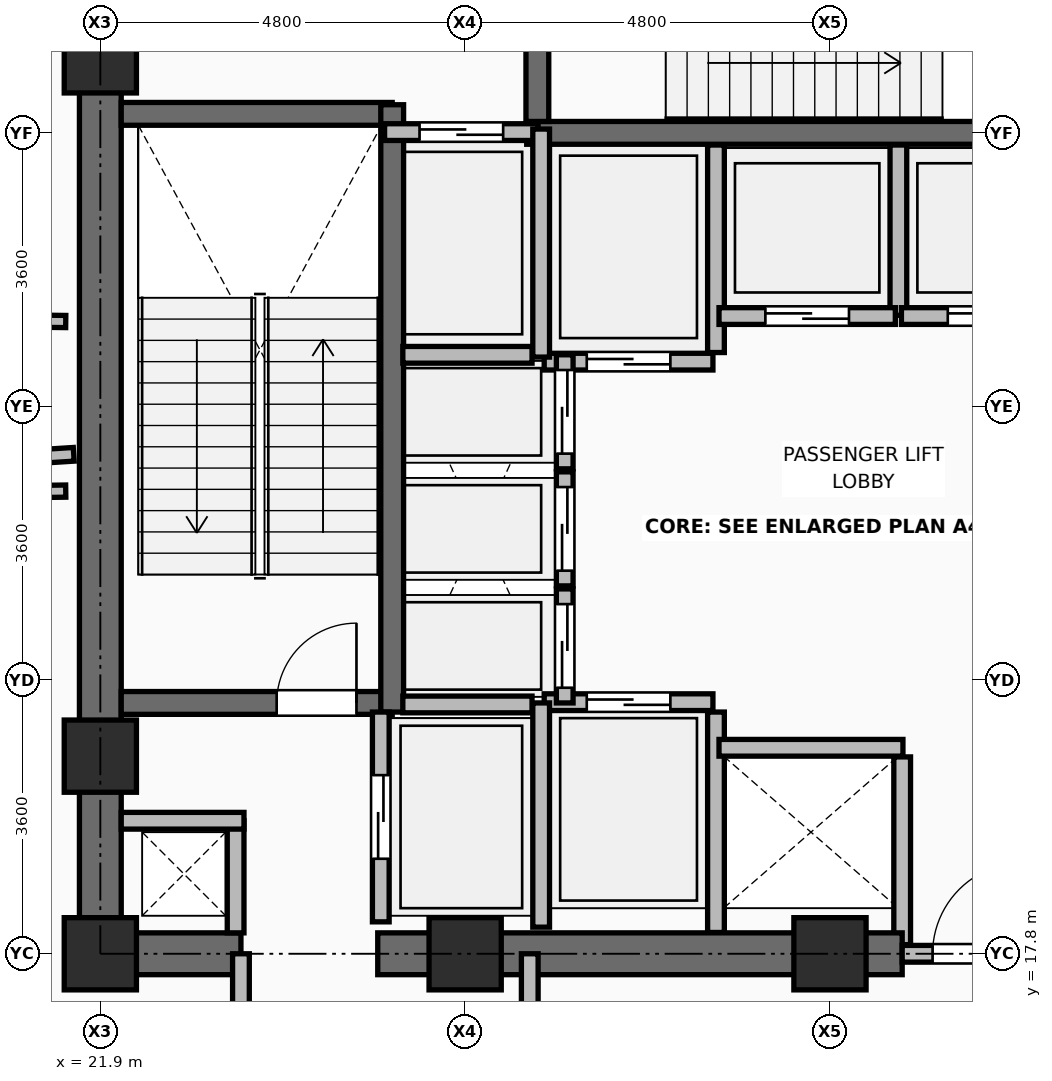
"""IFC4 building model, lengths in metres.
Left out: names, types, materials, properties, quantities, classifications, styles, units other than length and angle.
Written with IfcOpenShell. Run it as: python <this file> out.ifc"""

import sys

from ifc_helpers import new_model, si_unit, direction, frame, frame_2d, origin, origin_2d, place, context, subcontext, project, spatial, rectangle, extrude, element, fill, save


model = new_model("IFC4")
c1 = context("Model", 3, precision=1e-05, world=origin(), true_north=direction((0.0, 1.0)))
c2 = subcontext(c1, "Body", "Model", "MODEL_VIEW")
j1 = project(units=[si_unit("LENGTHUNIT", "METRE"), si_unit("PLANEANGLEUNIT", "RADIAN")], contexts=[c1])
p1 = place(None, origin())
s1 = spatial("IfcSite", under=j1, at=p1, CompositionType="ELEMENT")
p2 = place(p1, origin())
s2 = spatial("IfcBuilding", under=s1, at=p2, CompositionType="ELEMENT")
p3 = place(p2, frame((0.0, 0.0, 96.15)))
s3 = spatial("IfcBuildingStorey", under=s2, at=p3, CompositionType="ELEMENT", Elevation=96.15)
for number, where, z_axis, x_axis in (
    (1, (21.9, 17.8, 0.0), (0.0, 0.0, 1.0), (1.0, 0.0, 0.0)),
    (2, (26.7, 17.8, 0.0), (0.0, 0.0, 1.0), (1.0, 0.0, 0.0)),
    (3, (31.5, 17.8, 0.0), (0.0, 0.0, 1.0), (1.0, 0.0, 0.0)),
    (4, (21.9, 20.4, 0.0), (0.0, 0.0, 1.0), (1.0, 0.0, 0.0)),
    (5, (21.9, 29.6, 0.0), (0.0, 0.0, 1.0), (1.0, 0.0, 0.0)),
):
    element("IfcColumn", number, at=place(p3, frame(where, z_axis=z_axis, x_axis=x_axis)), inside=s3, PredefinedType="COLUMN", context=c2, shape_type="SweptSolid", body=[
        extrude(rectangle(XDim=0.95, YDim=0.95, at=origin_2d()), origin(), (0.0, 0.0, 1.0), 4.8),
    ])
p4 = place(p3, frame((30.0, 18.08, 0.0), z_axis=(0.0, 0.0, 1.0), x_axis=(0.0, 1.0, 0.0)))
e6 = element("IfcWall", 6, at=p4, inside=s3, PredefinedType="PARTITIONING", context=c2, shape_type="SweptSolid", body=[
    extrude(rectangle(XDim=2.9, YDim=0.22, at=frame_2d((1.45, 0.0))), origin(), (0.0, 0.0, 1.0), 4.595),
])
p5 = place(p3, frame((32.45, 17.92, 0.0), z_axis=(0.0, 0.0, 1.0), x_axis=(0.0, 1.0, 0.0)))
e7 = element("IfcWall", 7, at=p5, inside=s3, PredefinedType="PARTITIONING", context=c2, shape_type="SweptSolid", body=[
    extrude(rectangle(XDim=2.47, YDim=0.22, at=frame_2d((1.235, 0.0))), origin(), (0.0, 0.0, 1.0), 4.056),
])
p6 = place(p3, frame((30.0, 25.71, 0.0), z_axis=(0.0, 0.0, 1.0), x_axis=(0.0, 1.0, 0.0)))
e8 = element("IfcWall", 8, at=p6, inside=s3, PredefinedType="PARTITIONING", context=c2, shape_type="SweptSolid", body=[
    extrude(rectangle(XDim=2.73, YDim=0.22, at=frame_2d((1.365, 0.0))), origin(), (0.0, 0.0, 1.0), 4.595),
])
p7 = place(p3, frame((32.4, 26.2, 0.0), z_axis=(0.0, 0.0, 1.0), x_axis=(0.0, 1.0, 0.0)))
e9 = element("IfcWall", 9, at=p7, inside=s3, PredefinedType="PARTITIONING", context=c2, shape_type="SweptSolid", body=[
    extrude(rectangle(XDim=2.24, YDim=0.22, at=frame_2d((1.12, 0.0))), origin(), (0.0, 0.0, 1.0), 4.595),
])
p8 = place(p3, frame((21.625, 17.8, 0.0), z_axis=(0.0, 0.0, 1.0), x_axis=(1.0, 0.0, 0.0)))
e10 = element("IfcWall", 10, at=p8, inside=s3, PredefinedType="SHEAR", context=c2, shape_type="SweptSolid", body=[
    extrude(rectangle(XDim=2.125, YDim=0.55, at=frame_2d((1.062, 0.0))), origin(), (0.0, 0.0, 1.0), 4.62),
])
p9 = place(p3, frame((25.55, 17.8, 0.0), z_axis=(0.0, 0.0, 1.0), x_axis=(1.0, 0.0, 0.0)))
e11 = element("IfcWall", 11, at=p9, inside=s3, PredefinedType="SHEAR", context=c2, shape_type="SweptSolid", body=[
    extrude(rectangle(XDim=6.9, YDim=0.55, at=frame_2d((3.45, 0.0))), origin(), (0.0, 0.0, 1.0), 4.62),
])
p10 = place(p3, frame((32.45, 17.8, 0.0), z_axis=(0.0, 0.0, 1.0), x_axis=(1.0, 0.0, 0.0)))
e12 = element("IfcWall", 12, at=p10, inside=s3, PredefinedType="PARTITIONING", context=c2, shape_type="SweptSolid", body=[
    extrude(rectangle(XDim=2.5, YDim=0.22, at=frame_2d((1.25, 0.0))), origin(), (0.0, 0.0, 1.0), 4.056),
])
p11 = place(p10, frame((0.4, 0.0, 0.0)))
e13 = element("IfcOpeningElement", 13, at=p11, cuts=e12, PredefinedType="OPENING", context=c2, shape_type="SweptSolid", body=[
    extrude(rectangle(XDim=1.2, YDim=2.1, at=frame_2d((0.6, 1.05))), frame((0.0, 0.12, 0.0), z_axis=(0.0, -1.0, 0.0), x_axis=(1.0, 0.0, 0.0)), (0.0, 0.0, 1.0), 0.24),
])
p12 = place(p3, frame((21.9, 18.075, 0.0), z_axis=(0.0, 0.0, 1.0), x_axis=(0.0, 1.0, 0.0)))
e14 = element("IfcWall", 14, at=p12, inside=s3, PredefinedType="SHEAR", context=c2, shape_type="SweptSolid", body=[
    extrude(rectangle(XDim=14.1, YDim=0.55, at=frame_2d((7.05, 0.0))), origin(), (0.0, 0.0, 1.0), 4.62),
])
p13 = place(p3, frame((22.175, 21.1, 0.0), z_axis=(0.0, 0.0, 1.0), x_axis=(1.0, 0.0, 0.0)))
e15 = element("IfcWall", 15, at=p13, inside=s3, PredefinedType="SHEAR", context=c2, shape_type="SweptSolid", body=[
    extrude(rectangle(XDim=3.565, YDim=0.3, at=frame_2d((1.782, 0.0))), origin(), (0.0, 0.0, 1.0), 4.62),
])
p14 = place(p13, frame((2.045, 0.0, 0.0)))
e16 = element("IfcOpeningElement", 16, at=p14, cuts=e15, PredefinedType="OPENING", context=c2, shape_type="SweptSolid", body=[
    extrude(rectangle(XDim=1.05, YDim=2.1, at=frame_2d((0.525, 1.05))), frame((0.0, 0.16, 0.0), z_axis=(0.0, -1.0, 0.0), x_axis=(1.0, 0.0, 0.0)), (0.0, 0.0, 1.0), 0.32),
])
p15 = place(p3, frame((22.175, 28.85, 0.0), z_axis=(0.0, 0.0, 1.0), x_axis=(1.0, 0.0, 0.0)))
e17 = element("IfcWall", 17, at=p15, inside=s3, PredefinedType="SHEAR", context=c2, shape_type="SweptSolid", body=[
    extrude(rectangle(XDim=3.565, YDim=0.3, at=frame_2d((1.782, 0.0))), origin(), (0.0, 0.0, 1.0), 4.62),
])
p16 = place(p3, frame((25.74, 20.98, 0.0), z_axis=(0.0, 0.0, 1.0), x_axis=(0.0, 1.0, 0.0)))
e18 = element("IfcWall", 18, at=p16, inside=s3, PredefinedType="SHEAR", context=c2, shape_type="SweptSolid", body=[
    extrude(rectangle(XDim=7.99, YDim=0.3, at=frame_2d((3.995, 0.0))), origin(), (0.0, 0.0, 1.0), 4.62),
])
p17 = place(p3, frame((27.51, 28.6, 0.0), z_axis=(0.0, 0.0, 1.0), x_axis=(1.0, 0.0, 0.0)))
e19 = element("IfcWall", 19, at=p17, inside=s3, PredefinedType="SHEAR", context=c2, shape_type="SweptSolid", body=[
    extrude(rectangle(XDim=8.03, YDim=0.3, at=frame_2d((4.015, 0.0))), origin(), (0.0, 0.0, 1.0), 4.62),
])
p18 = place(p3, frame((27.65, 28.75, 0.0), z_axis=(0.0, 0.0, 1.0), x_axis=(0.0, 1.0, 0.0)))
e20 = element("IfcWall", 20, at=p18, inside=s3, PredefinedType="SHEAR", context=c2, shape_type="SweptSolid", body=[
    extrude(rectangle(XDim=3.425, YDim=0.3, at=frame_2d((1.712, 0.0))), origin(), (0.0, 0.0, 1.0), 4.62),
])
p19 = place(p18, frame((1.0, 0.0, 0.0)))
e21 = element("IfcOpeningElement", 21, at=p19, cuts=e20, PredefinedType="OPENING", context=c2, shape_type="SweptSolid", body=[
    extrude(rectangle(XDim=1.05, YDim=2.1, at=frame_2d((0.525, 1.05))), frame((0.0, 0.16, 0.0), z_axis=(0.0, -1.0, 0.0), x_axis=(1.0, 0.0, 0.0)), (0.0, 0.0, 1.0), 0.32),
])
p20 = place(p3, frame((23.68, 18.075, 0.0), z_axis=(0.0, 0.0, 1.0), x_axis=(0.0, 1.0, 0.0)))
e22 = element("IfcWall", 22, at=p20, inside=s3, PredefinedType="PARTITIONING", context=c2, shape_type="SweptSolid", body=[
    extrude(rectangle(XDim=1.475, YDim=0.22, at=frame_2d((0.738, 0.0))), origin(), (0.0, 0.0, 1.0), 4.6),
])
p21 = place(p3, frame((22.175, 19.55, 0.0), z_axis=(0.0, 0.0, 1.0), x_axis=(1.0, 0.0, 0.0)))
e23 = element("IfcWall", 23, at=p21, inside=s3, PredefinedType="PARTITIONING", context=c2, shape_type="SweptSolid", body=[
    extrude(rectangle(XDim=1.615, YDim=0.22, at=frame_2d((0.808, 0.0))), origin(), (0.0, 0.0, 1.0), 3.645),
])
p22 = place(p3, frame((25.59, 18.22, 0.0), z_axis=(0.0, 0.0, 1.0), x_axis=(0.0, 1.0, 0.0)))
e24 = element("IfcWall", 24, at=p22, inside=s3, PredefinedType="PARTITIONING", context=c2, shape_type="SweptSolid", body=[
    extrude(rectangle(XDim=2.76, YDim=0.22, at=frame_2d((1.38, 0.0))), origin(), (0.0, 0.0, 1.0), 4.6),
])
p23 = place(p22, frame((0.83, 0.0, 0.0)))
e25 = element("IfcOpeningElement", 25, at=p23, cuts=e24, PredefinedType="OPENING", context=c2, shape_type="SweptSolid", body=[
    extrude(rectangle(XDim=1.1, YDim=2.2, at=frame_2d((0.55, 1.1))), frame((0.0, 0.12, 0.0), z_axis=(0.0, -1.0, 0.0), x_axis=(1.0, 0.0, 0.0)), (0.0, 0.0, 1.0), 0.24),
])
p24 = place(p3, frame((25.64, 28.61, 0.0), z_axis=(0.0, 0.0, 1.0), x_axis=(1.0, 0.0, 0.0)))
e26 = element("IfcWall", 26, at=p24, inside=s3, PredefinedType="PARTITIONING", context=c2, shape_type="SweptSolid", body=[
    extrude(rectangle(XDim=2.02, YDim=0.22, at=frame_2d((1.01, 0.0))), origin(), (0.0, 0.0, 1.0), 4.6),
])
p25 = place(p24, frame((0.46, 0.0, 0.0)))
e27 = element("IfcOpeningElement", 27, at=p25, cuts=e26, PredefinedType="OPENING", context=c2, shape_type="SweptSolid", body=[
    extrude(rectangle(XDim=1.1, YDim=2.2, at=frame_2d((0.55, 1.1))), frame((0.0, 0.12, 0.0), z_axis=(0.0, -1.0, 0.0), x_axis=(1.0, 0.0, 0.0)), (0.0, 0.0, 1.0), 0.24),
])
p26 = place(p3, frame((27.74, 21.11, 0.0), z_axis=(0.0, 0.0, 1.0), x_axis=(1.0, 0.0, 0.0)))
e28 = element("IfcWall", 28, at=p26, inside=s3, PredefinedType="PARTITIONING", context=c2, shape_type="SweptSolid", body=[
    extrude(rectangle(XDim=2.22, YDim=0.22, at=frame_2d((1.11, 0.0))), origin(), (0.0, 0.0, 1.0), 4.6),
])
p27 = place(p26, frame((0.56, 0.0, 0.0)))
e29 = element("IfcOpeningElement", 29, at=p27, cuts=e28, PredefinedType="OPENING", context=c2, shape_type="SweptSolid", body=[
    extrude(rectangle(XDim=1.1, YDim=2.2, at=frame_2d((0.55, 1.1))), frame((0.0, 0.12, 0.0), z_axis=(0.0, -1.0, 0.0), x_axis=(1.0, 0.0, 0.0)), (0.0, 0.0, 1.0), 0.24),
])
p28 = place(p3, frame((27.74, 25.59, 0.0), z_axis=(0.0, 0.0, 1.0), x_axis=(1.0, 0.0, 0.0)))
e30 = element("IfcWall", 30, at=p28, inside=s3, PredefinedType="PARTITIONING", context=c2, shape_type="SweptSolid", body=[
    extrude(rectangle(XDim=2.22, YDim=0.22, at=frame_2d((1.11, 0.0))), origin(), (0.0, 0.0, 1.0), 4.6),
])
p29 = place(p28, frame((0.56, 0.0, 0.0)))
e31 = element("IfcOpeningElement", 31, at=p29, cuts=e30, PredefinedType="OPENING", context=c2, shape_type="SweptSolid", body=[
    extrude(rectangle(XDim=1.1, YDim=2.2, at=frame_2d((0.55, 1.1))), frame((0.0, 0.12, 0.0), z_axis=(0.0, -1.0, 0.0), x_axis=(1.0, 0.0, 0.0)), (0.0, 0.0, 1.0), 0.24),
])
p30 = place(p3, frame((30.04, 20.51, 0.0), z_axis=(0.0, 0.0, 1.0), x_axis=(1.0, 0.0, 0.0)))
e32 = element("IfcWall", 32, at=p30, inside=s3, PredefinedType="PARTITIONING", context=c2, shape_type="SweptSolid", body=[
    extrude(rectangle(XDim=2.42, YDim=0.22, at=frame_2d((1.21, 0.0))), origin(), (0.0, 0.0, 1.0), 4.6),
])
p31 = place(p3, frame((30.04, 26.19, 0.0), z_axis=(0.0, 0.0, 1.0), x_axis=(1.0, 0.0, 0.0)))
e33 = element("IfcWall", 33, at=p31, inside=s3, PredefinedType="PARTITIONING", context=c2, shape_type="SweptSolid", body=[
    extrude(rectangle(XDim=2.32, YDim=0.22, at=frame_2d((1.16, 0.0))), origin(), (0.0, 0.0, 1.0), 4.6),
])
p32 = place(p31, frame((0.61, 0.0, 0.0)))
e34 = element("IfcOpeningElement", 34, at=p32, cuts=e33, PredefinedType="OPENING", context=c2, shape_type="SweptSolid", body=[
    extrude(rectangle(XDim=1.1, YDim=2.2, at=frame_2d((0.55, 1.1))), frame((0.0, 0.12, 0.0), z_axis=(0.0, -1.0, 0.0), x_axis=(1.0, 0.0, 0.0)), (0.0, 0.0, 1.0), 0.24),
])
p33 = place(p3, frame((32.44, 26.19, 0.0), z_axis=(0.0, 0.0, 1.0), x_axis=(1.0, 0.0, 0.0)))
e35 = element("IfcWall", 35, at=p33, inside=s3, PredefinedType="PARTITIONING", context=c2, shape_type="SweptSolid", body=[
    extrude(rectangle(XDim=2.32, YDim=0.22, at=frame_2d((1.16, 0.0))), origin(), (0.0, 0.0, 1.0), 4.6),
])
p34 = place(p33, frame((0.61, 0.0, 0.0)))
e36 = element("IfcOpeningElement", 36, at=p34, cuts=e35, PredefinedType="OPENING", context=c2, shape_type="SweptSolid", body=[
    extrude(rectangle(XDim=1.1, YDim=2.2, at=frame_2d((0.55, 1.1))), frame((0.0, 0.12, 0.0), z_axis=(0.0, -1.0, 0.0), x_axis=(1.0, 0.0, 0.0)), (0.0, 0.0, 1.0), 0.24),
])
p35 = place(p3, frame((28.01, 21.1, 0.0), z_axis=(0.0, 0.0, 1.0), x_axis=(0.0, 1.0, 0.0)))
e37 = element("IfcWall", 37, at=p35, inside=s3, PredefinedType="PARTITIONING", context=c2, shape_type="SweptSolid", body=[
    extrude(rectangle(XDim=1.5, YDim=0.22, at=frame_2d((0.75, 0.0))), origin(), (0.0, 0.0, 1.0), 4.6),
])
p36 = place(p35, frame((0.2, 0.0, 0.0)))
e38 = element("IfcOpeningElement", 38, at=p36, cuts=e37, PredefinedType="OPENING", context=c2, shape_type="SweptSolid", body=[
    extrude(rectangle(XDim=1.1, YDim=2.2, at=frame_2d((0.55, 1.1))), frame((0.0, 0.12, 0.0), z_axis=(0.0, -1.0, 0.0), x_axis=(1.0, 0.0, 0.0)), (0.0, 0.0, 1.0), 0.24),
])
p37 = place(p3, frame((28.01, 22.64, 0.0), z_axis=(0.0, 0.0, 1.0), x_axis=(0.0, 1.0, 0.0)))
e39 = element("IfcWall", 39, at=p37, inside=s3, PredefinedType="PARTITIONING", context=c2, shape_type="SweptSolid", body=[
    extrude(rectangle(XDim=1.5, YDim=0.22, at=frame_2d((0.75, 0.0))), origin(), (0.0, 0.0, 1.0), 4.6),
])
p38 = place(p37, frame((0.2, 0.0, 0.0)))
e40 = element("IfcOpeningElement", 40, at=p38, cuts=e39, PredefinedType="OPENING", context=c2, shape_type="SweptSolid", body=[
    extrude(rectangle(XDim=1.1, YDim=2.2, at=frame_2d((0.55, 1.1))), frame((0.0, 0.12, 0.0), z_axis=(0.0, -1.0, 0.0), x_axis=(1.0, 0.0, 0.0)), (0.0, 0.0, 1.0), 0.24),
])
p39 = place(p3, frame((28.01, 24.18, 0.0), z_axis=(0.0, 0.0, 1.0), x_axis=(0.0, 1.0, 0.0)))
e41 = element("IfcWall", 41, at=p39, inside=s3, PredefinedType="PARTITIONING", context=c2, shape_type="SweptSolid", body=[
    extrude(rectangle(XDim=1.5, YDim=0.22, at=frame_2d((0.75, 0.0))), origin(), (0.0, 0.0, 1.0), 4.6),
])
p40 = place(p39, frame((0.2, 0.0, 0.0)))
e42 = element("IfcOpeningElement", 42, at=p40, cuts=e41, PredefinedType="OPENING", context=c2, shape_type="SweptSolid", body=[
    extrude(rectangle(XDim=1.1, YDim=2.2, at=frame_2d((0.55, 1.1))), frame((0.0, 0.12, 0.0), z_axis=(0.0, -1.0, 0.0), x_axis=(1.0, 0.0, 0.0)), (0.0, 0.0, 1.0), 0.24),
])
p41 = place(p3, frame((27.7, 18.15, 0.0), z_axis=(0.0, 0.0, 1.0), x_axis=(0.0, 1.0, 0.0)))
e43 = element("IfcWall", 43, at=p41, inside=s3, PredefinedType="PARTITIONING", context=c2, shape_type="SweptSolid", body=[
    extrude(rectangle(XDim=2.95, YDim=0.22, at=frame_2d((1.475, 0.0))), origin(), (0.0, 0.0, 1.0), 4.6),
])
p42 = place(p3, frame((27.7, 25.65, 0.0), z_axis=(0.0, 0.0, 1.0), x_axis=(0.0, 1.0, 0.0)))
e44 = element("IfcWall", 44, at=p42, inside=s3, PredefinedType="PARTITIONING", context=c2, shape_type="SweptSolid", body=[
    extrude(rectangle(XDim=3.0, YDim=0.22, at=frame_2d((1.5, 0.0))), origin(), (0.0, 0.0, 1.0), 4.6),
])
for number, where, z_axis, x_axis in (
    (45, (25.88, 21.08, 0.0), (0.0, 0.0, 1.0), (1.0, 0.0, 0.0)),
    (46, (25.88, 25.68, 0.0), (0.0, 0.0, 1.0), (1.0, 0.0, 0.0)),
):
    element("IfcWall", number, at=place(p3, frame(where, z_axis=z_axis, x_axis=x_axis)), inside=s3, PredefinedType="PARTITIONING", context=c2, shape_type="SweptSolid", body=[
        extrude(rectangle(XDim=1.7, YDim=0.22, at=frame_2d((0.85, 0.0))), origin(), (0.0, 0.0, 1.0), 4.6),
    ])
p43 = place(p3, frame((23.75, 14.35, 0.0), z_axis=(0.0, 0.0, 1.0), x_axis=(0.0, 1.0, 0.0)))
e47 = element("IfcWall", 47, at=p43, inside=s3, PredefinedType="PARTITIONING", context=c2, shape_type="SweptSolid", body=[
    extrude(rectangle(XDim=3.45, YDim=0.22, at=frame_2d((1.725, 0.0))), origin(), (0.0, 0.0, 1.0), 4.056),
])
p44 = place(p3, frame((27.55, 14.35, 0.0), z_axis=(0.0, 0.0, 1.0), x_axis=(0.0, 1.0, 0.0)))
e48 = element("IfcWall", 48, at=p44, inside=s3, PredefinedType="PARTITIONING", context=c2, shape_type="SweptSolid", body=[
    extrude(rectangle(XDim=3.45, YDim=0.22, at=frame_2d((1.725, 0.0))), origin(), (0.0, 0.0, 1.0), 4.056),
])
p45 = place(p44, frame((1.175, 0.0, 0.0)))
e49 = element("IfcOpeningElement", 49, at=p45, cuts=e48, PredefinedType="OPENING", context=c2, shape_type="SweptSolid", body=[
    extrude(rectangle(XDim=1.1, YDim=2.1, at=frame_2d((0.55, 1.05))), frame((0.0, 0.12, 0.0), z_axis=(0.0, -1.0, 0.0), x_axis=(1.0, 0.0, 0.0)), (0.0, 0.0, 1.0), 0.24),
])
for number, where, z_axis, x_axis in (
    (50, (21.445, 26.118, 0.0), (0.0, 0.0, 1.0), (-1.0, 0.012, 0.0)),
    (51, (19.386, 23.858, 0.0), (0.0, 0.0, 1.0), (1.0, 0.014, 0.0)),
):
    element("IfcWall", number, at=place(p3, frame(where, z_axis=z_axis, x_axis=x_axis)), inside=s3, PredefinedType="PARTITIONING", context=c2, shape_type="SweptSolid", body=[
        extrude(rectangle(XDim=2.059, YDim=0.16, at=frame_2d((1.03, 0.0))), origin(), (0.0, 0.0, 1.0), 3.645),
    ])
p46 = place(p3, frame((21.55, 24.371, 0.0), z_axis=(0.0, 0.0, 1.0), x_axis=(-0.998010790875, -0.06304332873, 0.0)))
e52 = element("IfcWall", 52, at=p46, inside=s3, PredefinedType="PARTITIONING", context=c2, shape_type="SweptSolid", body=[
    extrude(rectangle(XDim=16.021, YDim=0.18, at=frame_2d((8.01, 0.0))), origin(), (0.0, 0.0, 1.0), 3.645),
])
p47 = place(p11, origin())
e53 = element("IfcDoor", 53, at=p47, inside=s3, OperationType="SINGLE_SWING_RIGHT", PredefinedType="DOOR", context=c2, shape_type="SweptSolid", body=[
    extrude(rectangle(XDim=1.2, YDim=2.1, at=frame_2d((0.6, 1.05))), frame((0.0, 0.025, 0.0), z_axis=(0.0, -1.0, 0.0), x_axis=(1.0, 0.0, 0.0)), (0.0, 0.0, 1.0), 0.05),
])
fill(e13, e53)
p48 = place(p14, origin())
e54 = element("IfcDoor", 54, at=p48, inside=s3, OperationType="SINGLE_SWING_RIGHT", PredefinedType="DOOR", context=c2, shape_type="SweptSolid", body=[
    extrude(rectangle(XDim=1.05, YDim=2.1, at=frame_2d((0.525, 1.05))), frame((0.0, 0.025, 0.0), z_axis=(0.0, -1.0, 0.0), x_axis=(1.0, 0.0, 0.0)), (0.0, 0.0, 1.0), 0.05),
])
fill(e16, e54)
p49 = place(p23, origin())
e55 = element("IfcDoor", 55, at=p49, inside=s3, OperationType="DOUBLE_DOOR_SLIDING", PredefinedType="DOOR", context=c2, shape_type="SweptSolid", body=[
    extrude(rectangle(XDim=1.1, YDim=2.2, at=frame_2d((0.55, 1.1))), frame((0.0, 0.025, 0.0), z_axis=(0.0, -1.0, 0.0), x_axis=(1.0, 0.0, 0.0)), (0.0, 0.0, 1.0), 0.05),
])
fill(e25, e55)
p50 = place(p25, origin())
e56 = element("IfcDoor", 56, at=p50, inside=s3, OperationType="DOUBLE_DOOR_SLIDING", PredefinedType="DOOR", context=c2, shape_type="SweptSolid", body=[
    extrude(rectangle(XDim=1.1, YDim=2.2, at=frame_2d((0.55, 1.1))), frame((0.0, 0.025, 0.0), z_axis=(0.0, -1.0, 0.0), x_axis=(1.0, 0.0, 0.0)), (0.0, 0.0, 1.0), 0.05),
])
fill(e27, e56)
p51 = place(p27, origin())
e57 = element("IfcDoor", 57, at=p51, inside=s3, OperationType="DOUBLE_DOOR_SLIDING", PredefinedType="DOOR", context=c2, shape_type="SweptSolid", body=[
    extrude(rectangle(XDim=1.1, YDim=2.2, at=frame_2d((0.55, 1.1))), frame((0.0, 0.025, 0.0), z_axis=(0.0, -1.0, 0.0), x_axis=(1.0, 0.0, 0.0)), (0.0, 0.0, 1.0), 0.05),
])
fill(e29, e57)
p52 = place(p29, frame((1.1, 0.0, 0.0), z_axis=(0.0, 0.0, 1.0), x_axis=(-1.0, 0.0, 0.0)))
e58 = element("IfcDoor", 58, at=p52, inside=s3, OperationType="DOUBLE_DOOR_SLIDING", PredefinedType="DOOR", context=c2, shape_type="SweptSolid", body=[
    extrude(rectangle(XDim=1.1, YDim=2.2, at=frame_2d((0.55, 1.1))), frame((0.0, 0.025, 0.0), z_axis=(0.0, -1.0, 0.0), x_axis=(1.0, 0.0, 0.0)), (0.0, 0.0, 1.0), 0.05),
])
fill(e31, e58)
p53 = place(p32, frame((1.1, 0.0, 0.0), z_axis=(0.0, 0.0, 1.0), x_axis=(-1.0, 0.0, 0.0)))
e59 = element("IfcDoor", 59, at=p53, inside=s3, OperationType="DOUBLE_DOOR_SLIDING", PredefinedType="DOOR", context=c2, shape_type="SweptSolid", body=[
    extrude(rectangle(XDim=1.1, YDim=2.2, at=frame_2d((0.55, 1.1))), frame((0.0, 0.025, 0.0), z_axis=(0.0, -1.0, 0.0), x_axis=(1.0, 0.0, 0.0)), (0.0, 0.0, 1.0), 0.05),
])
fill(e34, e59)
p54 = place(p34, frame((1.1, 0.0, 0.0), z_axis=(0.0, 0.0, 1.0), x_axis=(-1.0, 0.0, 0.0)))
e60 = element("IfcDoor", 60, at=p54, inside=s3, OperationType="DOUBLE_DOOR_SLIDING", PredefinedType="DOOR", context=c2, shape_type="SweptSolid", body=[
    extrude(rectangle(XDim=1.1, YDim=2.2, at=frame_2d((0.55, 1.1))), frame((0.0, 0.025, 0.0), z_axis=(0.0, -1.0, 0.0), x_axis=(1.0, 0.0, 0.0)), (0.0, 0.0, 1.0), 0.05),
])
fill(e36, e60)
p55 = place(p36, frame((1.1, 0.0, 0.0), z_axis=(0.0, 0.0, 1.0), x_axis=(-1.0, 0.0, 0.0)))
e61 = element("IfcDoor", 61, at=p55, inside=s3, OperationType="DOUBLE_DOOR_SLIDING", PredefinedType="DOOR", context=c2, shape_type="SweptSolid", body=[
    extrude(rectangle(XDim=1.1, YDim=2.2, at=frame_2d((0.55, 1.1))), frame((0.0, 0.025, 0.0), z_axis=(0.0, -1.0, 0.0), x_axis=(1.0, 0.0, 0.0)), (0.0, 0.0, 1.0), 0.05),
])
fill(e38, e61)
p56 = place(p38, frame((1.1, 0.0, 0.0), z_axis=(0.0, 0.0, 1.0), x_axis=(-1.0, 0.0, 0.0)))
e62 = element("IfcDoor", 62, at=p56, inside=s3, OperationType="DOUBLE_DOOR_SLIDING", PredefinedType="DOOR", context=c2, shape_type="SweptSolid", body=[
    extrude(rectangle(XDim=1.1, YDim=2.2, at=frame_2d((0.55, 1.1))), frame((0.0, 0.025, 0.0), z_axis=(0.0, -1.0, 0.0), x_axis=(1.0, 0.0, 0.0)), (0.0, 0.0, 1.0), 0.05),
])
fill(e40, e62)
p57 = place(p40, frame((1.1, 0.0, 0.0), z_axis=(0.0, 0.0, 1.0), x_axis=(-1.0, 0.0, 0.0)))
e63 = element("IfcDoor", 63, at=p57, inside=s3, OperationType="DOUBLE_DOOR_SLIDING", PredefinedType="DOOR", context=c2, shape_type="SweptSolid", body=[
    extrude(rectangle(XDim=1.1, YDim=2.2, at=frame_2d((0.55, 1.1))), frame((0.0, 0.025, 0.0), z_axis=(0.0, -1.0, 0.0), x_axis=(1.0, 0.0, 0.0)), (0.0, 0.0, 1.0), 0.05),
])
fill(e42, e63)
save(model, sys.argv[1])
